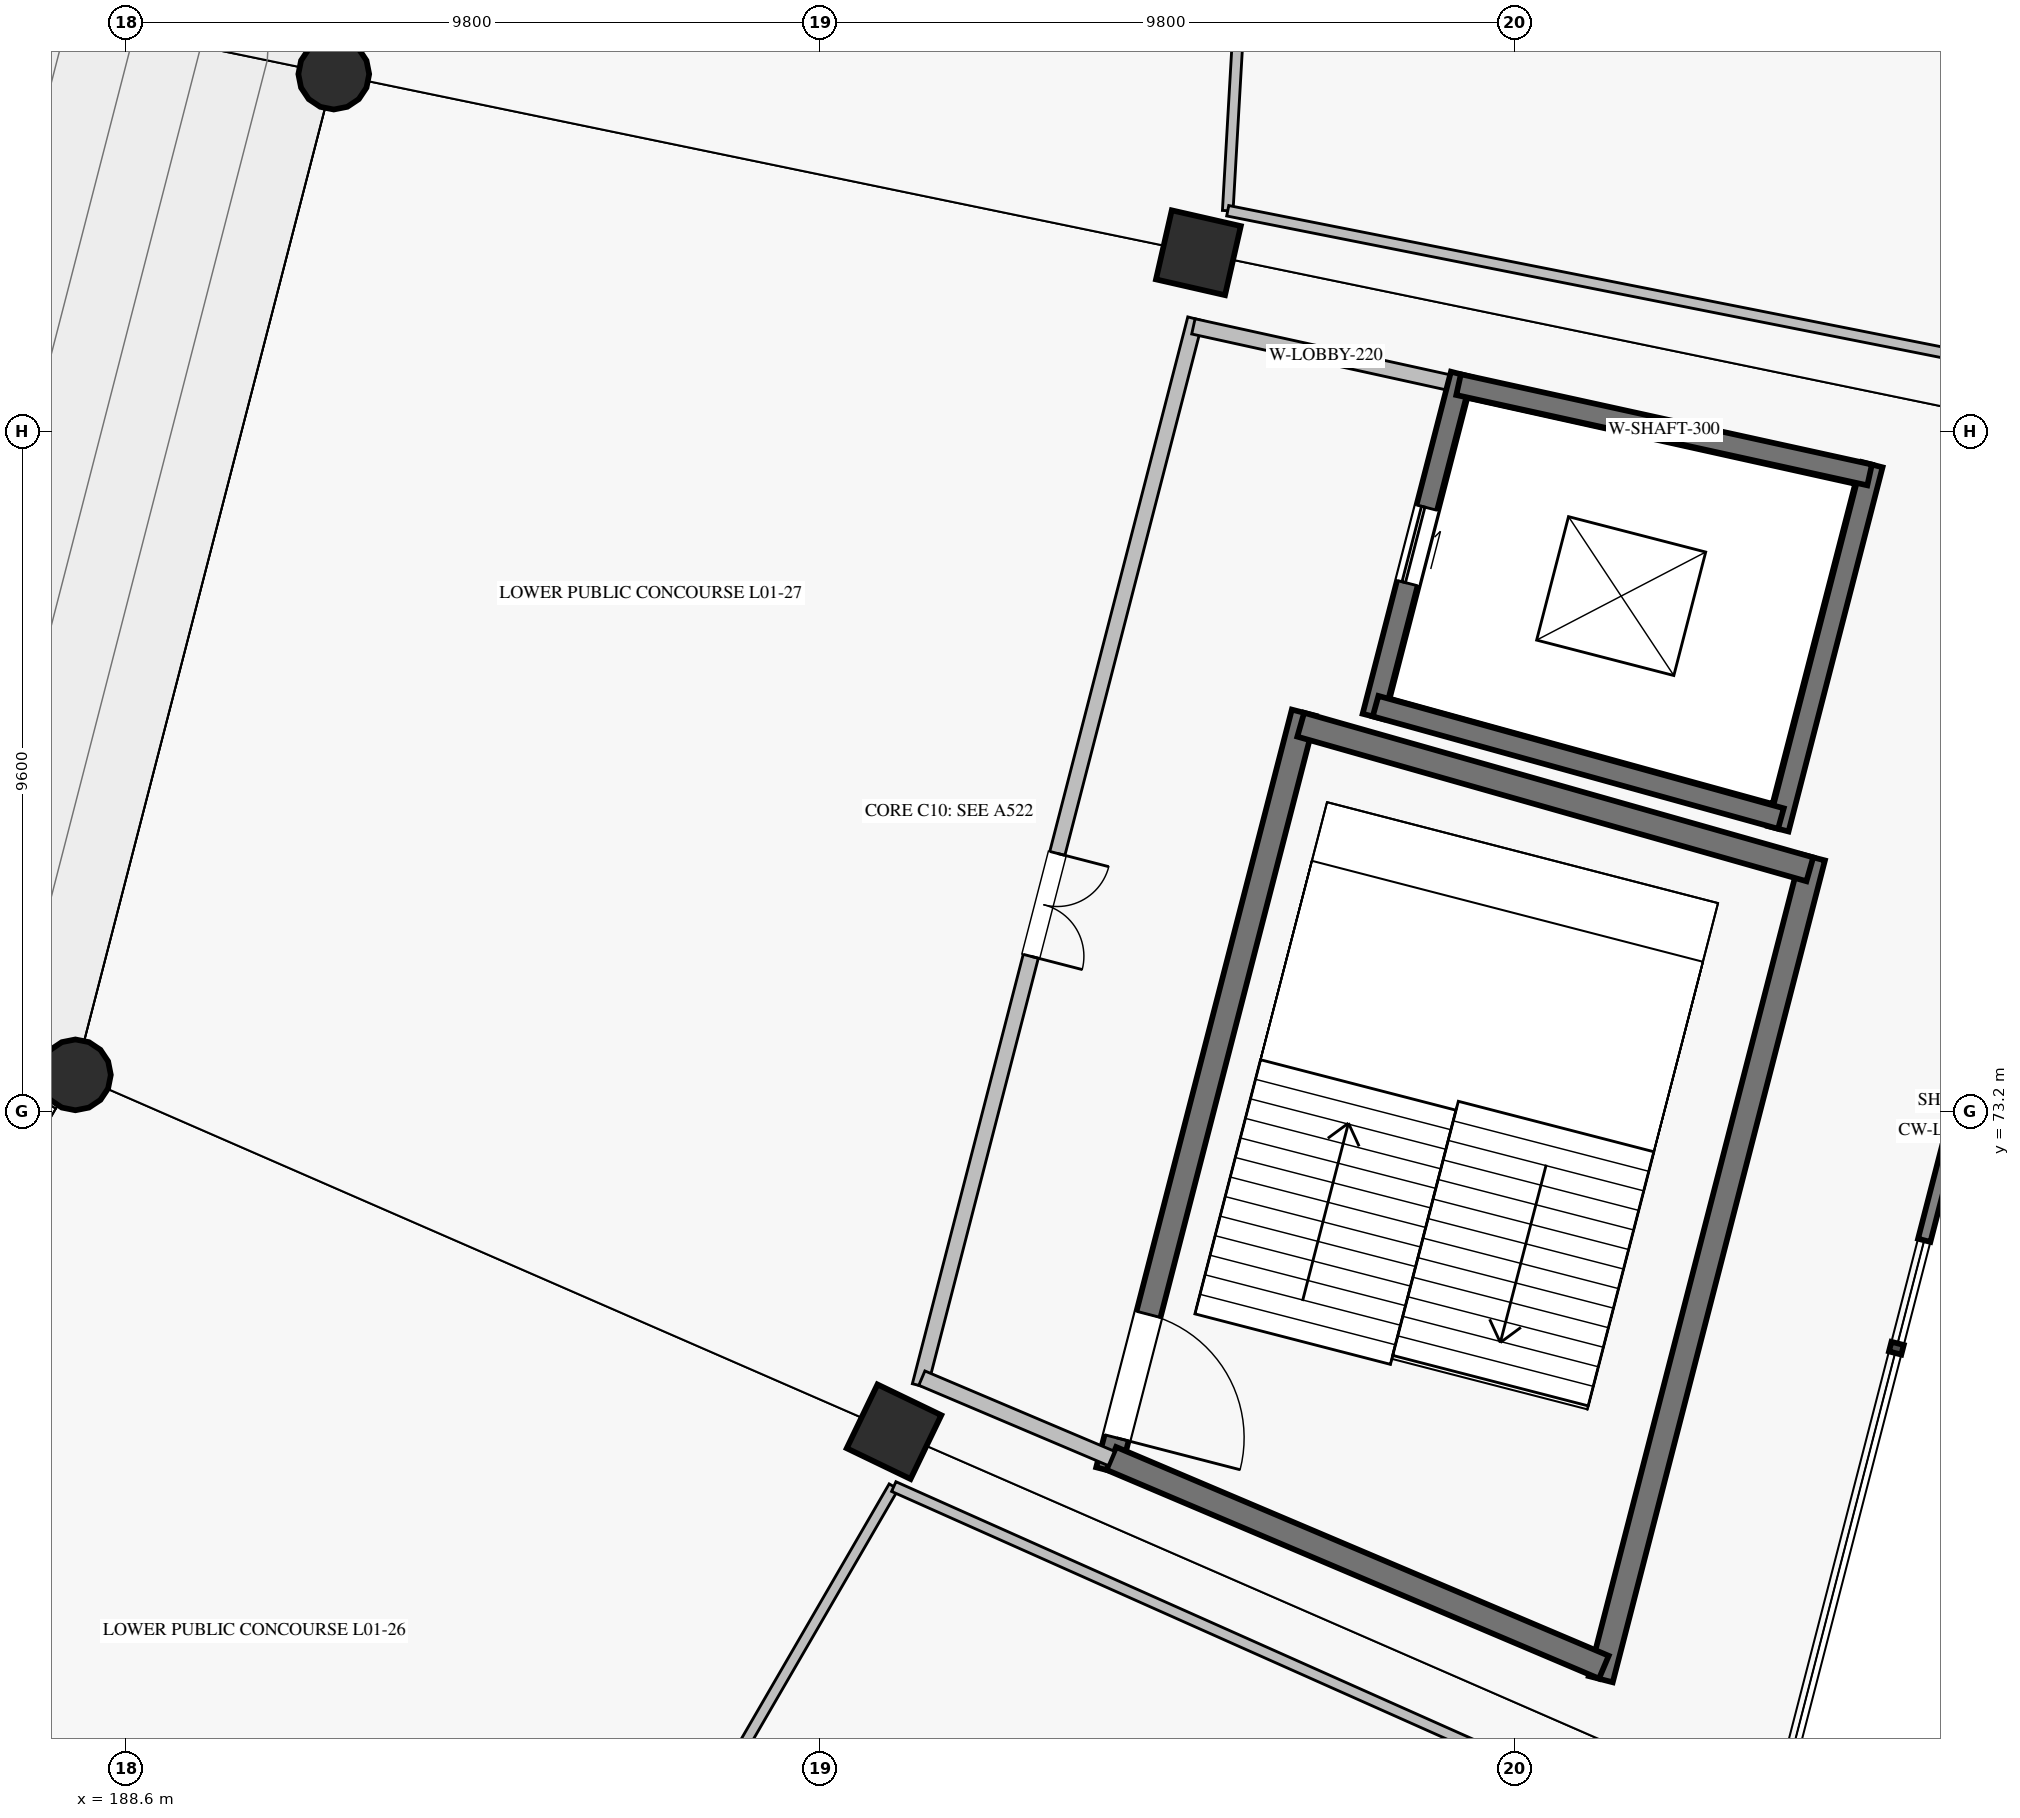
"""IFC4 building model, lengths in metres.
Left out: names, types, materials, properties, quantities, classifications, styles, units other than length and angle.
Written with IfcOpenShell. Run it as: python <this file> out.ifc"""

import sys

from ifc_helpers import new_model, si_unit, direction, frame, frame_2d, origin, origin_2d, place, context, subcontext, project, spatial, rectangle, circle, extrude, element, fill, save


model = new_model("IFC4")
c1 = context("Model", 3, precision=1e-05, world=origin(), true_north=direction((0.0, 1.0)))
c2 = subcontext(c1, "Body", "Model", "MODEL_VIEW")
j1 = project(units=[si_unit("LENGTHUNIT", "METRE"), si_unit("PLANEANGLEUNIT", "RADIAN")], contexts=[c1])
p1 = place(None, origin())
s1 = spatial("IfcSite", under=j1, at=p1, CompositionType="ELEMENT")
p2 = place(p1, origin())
s2 = spatial("IfcBuilding", under=s1, at=p2, CompositionType="ELEMENT")
p3 = place(p2, frame((0.0, 0.0, 5.78)))
s3 = spatial("IfcBuildingStorey", under=s2, at=p3, CompositionType="ELEMENT", Elevation=5.78)
for number, where, z_axis, x_axis in (
    (1, (187.886, 73.713, 0.0), (0.0, 0.0, 1.0), (0.901, -0.434, 0.0)),
    (2, (191.533, 87.84, 0.0), (0.0, 0.0, 1.0), (0.975, -0.223, 0.0)),
):
    element("IfcColumn", number, at=place(p3, frame(where, z_axis=z_axis, x_axis=x_axis)), inside=s3, PredefinedType="COLUMN", context=c2, shape_type="SweptSolid", body=[
        extrude(circle(Radius=0.5, at=origin_2d()), origin(), (0.0, 0.0, 1.0), 4.76),
    ])
for number, where, z_axis, x_axis in (
    (3, (199.441, 68.675, 0.0), (0.0, 0.0, 1.0), (0.901, -0.434, 0.0)),
    (4, (203.738, 85.318, 0.0), (0.0, 0.0, 1.0), (0.975, -0.223, 0.0)),
):
    element("IfcColumn", number, at=place(p3, frame(where, z_axis=z_axis, x_axis=x_axis)), inside=s3, PredefinedType="COLUMN", context=c2, shape_type="SweptSolid", body=[
        extrude(rectangle(XDim=1.0, YDim=1.0, at=origin_2d()), origin(), (0.0, 0.0, 1.0), 4.76),
    ])
p4 = place(p3, frame((202.464, 68.129, 0.0), z_axis=(0.0, 0.0, 1.0), x_axis=(0.249959564539, 0.968256276042, 0.0)))
e5 = element("IfcWall", 5, at=p4, inside=s3, PredefinedType="SHEAR", context=c2, shape_type="SweptSolid", body=[
    extrude(rectangle(XDim=11.047, YDim=0.35, at=frame_2d((5.523, 0.0))), origin(), (0.0, 0.0, 1.0), 4.5),
])
p5 = place(p4, frame((0.475, 0.0, 0.0)))
e6 = element("IfcOpeningElement", 6, at=p5, cuts=e5, PredefinedType="OPENING", context=c2, shape_type="SweptSolid", body=[
    extrude(rectangle(XDim=1.8, YDim=2.2, at=frame_2d((0.9, 1.1))), frame((0.0, 0.185, 0.0), z_axis=(0.0, -1.0, 0.0), x_axis=(1.0, 0.0, 0.0)), (0.0, 0.0, 1.0), 0.37),
])
p6 = place(p3, frame((209.417, 65.182, 0.0), z_axis=(0.0, 0.0, 1.0), x_axis=(0.249969221583, 0.968253782983, 0.0)))
e7 = element("IfcWall", 7, at=p6, inside=s3, PredefinedType="SHEAR", context=c2, shape_type="SweptSolid", body=[
    extrude(rectangle(XDim=11.982, YDim=0.35, at=frame_2d((5.991, 0.0))), origin(), (0.0, 0.0, 1.0), 4.5),
])
p7 = place(p3, frame((202.508, 68.299, 0.0), z_axis=(0.0, 0.0, 1.0), x_axis=(0.920704667209, -0.390260061728, 0.0)))
e8 = element("IfcWall", 8, at=p7, inside=s3, PredefinedType="SHEAR", context=c2, shape_type="SweptSolid", body=[
    extrude(rectangle(XDim=7.552, YDim=0.35, at=frame_2d((3.776, 0.0))), origin(), (0.0, 0.0, 1.0), 4.5),
])
p8 = place(p3, frame((205.182, 78.656, 0.0), z_axis=(0.0, 0.0, 1.0), x_axis=(0.961945802461, -0.273240321195, 0.0)))
e9 = element("IfcWall", 9, at=p8, inside=s3, PredefinedType="SHEAR", context=c2, shape_type="SweptSolid", body=[
    extrude(rectangle(XDim=7.47, YDim=0.35, at=frame_2d((3.735, 0.0))), origin(), (0.0, 0.0, 1.0), 4.5),
])
p9 = place(p3, frame((206.201, 78.772, 0.0), z_axis=(0.0, 0.0, 1.0), x_axis=(0.249946120621, 0.968259746549, 0.0)))
e10 = element("IfcWall", 10, at=p9, inside=s3, PredefinedType="SHEAR", context=c2, shape_type="SweptSolid", body=[
    extrude(rectangle(XDim=4.987, YDim=0.3, at=frame_2d((2.494, 0.0))), origin(), (0.0, 0.0, 1.0), 4.5),
])
p10 = place(p9, frame((1.944, 0.0, 0.0)))
e11 = element("IfcOpeningElement", 11, at=p10, cuts=e10, PredefinedType="OPENING", context=c2, shape_type="SweptSolid", body=[
    extrude(rectangle(XDim=1.1, YDim=2.2, at=frame_2d((0.55, 1.1))), frame((0.0, 0.16, 0.0), z_axis=(0.0, -1.0, 0.0), x_axis=(1.0, 0.0, 0.0)), (0.0, 0.0, 1.0), 0.32),
])
p11 = place(p3, frame((211.923, 77.186, 0.0), z_axis=(0.0, 0.0, 1.0), x_axis=(0.249918349381, 0.968266914979, 0.0)))
e12 = element("IfcWall", 12, at=p11, inside=s3, PredefinedType="SHEAR", context=c2, shape_type="SweptSolid", body=[
    extrude(rectangle(XDim=5.309, YDim=0.3, at=frame_2d((2.655, 0.0))), origin(), (0.0, 0.0, 1.0), 4.5),
])
p12 = place(p3, frame((206.239, 78.917, 0.0), z_axis=(0.0, 0.0, 1.0), x_axis=(0.963642107639, -0.267196348002, 0.0)))
e13 = element("IfcWall", 13, at=p12, inside=s3, PredefinedType="SHEAR", context=c2, shape_type="SweptSolid", body=[
    extrude(rectangle(XDim=5.937, YDim=0.3, at=frame_2d((2.969, 0.0))), origin(), (0.0, 0.0, 1.0), 4.5),
])
p13 = place(p3, frame((207.41, 83.456, 0.0), z_axis=(0.0, 0.0, 1.0), x_axis=(0.976707381947, -0.214575604509, 0.0)))
e14 = element("IfcWall", 14, at=p13, inside=s3, PredefinedType="SHEAR", context=c2, shape_type="SweptSolid", body=[
    extrude(rectangle(XDim=5.94, YDim=0.3, at=frame_2d((2.97, 0.0))), origin(), (0.0, 0.0, 1.0), 4.5),
])
p14 = place(p3, frame((199.807, 69.325, 0.0), z_axis=(0.0, 0.0, 1.0), x_axis=(0.249963472505, 0.968255267176, 0.0)))
e15 = element("IfcWall", 15, at=p14, inside=s3, PredefinedType="SOLIDWALL", context=c2, shape_type="SweptSolid", body=[
    extrude(rectangle(XDim=15.553, YDim=0.22, at=frame_2d((7.776, 0.0))), origin(), (0.0, 0.0, 1.0), 3.448),
])
p15 = place(p14, frame((6.26, 0.0, 0.0)))
e16 = element("IfcOpeningElement", 16, at=p15, cuts=e15, PredefinedType="OPENING", context=c2, shape_type="SweptSolid", body=[
    extrude(rectangle(XDim=1.5, YDim=2.2, at=frame_2d((0.75, 1.1))), frame((0.0, 0.12, 0.0), z_axis=(0.0, -1.0, 0.0), x_axis=(1.0, 0.0, 0.0)), (0.0, 0.0, 1.0), 0.24),
])
p16 = place(p3, frame((199.834, 69.432, 0.0), z_axis=(0.0, 0.0, 1.0), x_axis=(0.920711790761, -0.390243255361, 0.0)))
e17 = element("IfcWall", 17, at=p16, inside=s3, PredefinedType="SOLIDWALL", context=c2, shape_type="SweptSolid", body=[
    extrude(rectangle(XDim=2.904, YDim=0.22, at=frame_2d((1.452, 0.0))), origin(), (0.0, 0.0, 1.0), 4.5),
])
p17 = place(p3, frame((203.667, 84.278, 0.0), z_axis=(0.0, 0.0, 1.0), x_axis=(0.976714725209, -0.214542176645, 0.0)))
e18 = element("IfcWall", 18, at=p17, inside=s3, PredefinedType="SOLIDWALL", context=c2, shape_type="SweptSolid", body=[
    extrude(rectangle(XDim=3.833, YDim=0.22, at=frame_2d((1.917, 0.0))), origin(), (0.0, 0.0, 1.0), 4.5),
])
p18 = place(p3, frame((191.179, 53.658, 0.0), z_axis=(0.0, 0.0, 1.0), x_axis=(0.501617777052, 0.865089362867, 0.0)))
e19 = element("IfcWall", 19, at=p18, inside=s3, PredefinedType="PARTITIONING", context=c2, shape_type="SweptSolid", body=[
    extrude(rectangle(XDim=16.464, YDim=0.15, at=frame_2d((8.232, 0.0))), origin(), (0.0, 0.0, 1.0), 3.82),
])
p19 = place(p18, frame((7.557, 0.0, 0.0)))
e20 = element("IfcOpeningElement", 20, at=p19, cuts=e19, PredefinedType="OPENING", context=c2, shape_type="SweptSolid", body=[
    extrude(rectangle(XDim=1.35, YDim=2.15, at=frame_2d((0.675, 1.075))), frame((0.0, 0.085, 0.0), z_axis=(0.0, -1.0, 0.0), x_axis=(1.0, 0.0, 0.0)), (0.0, 0.0, 1.0), 0.17),
])
p20 = place(p3, frame((199.438, 67.901, 0.0), z_axis=(0.0, 0.0, 1.0), x_axis=(0.913245562849, -0.407409550621, 0.0)))
e21 = element("IfcWall", 21, at=p20, inside=s3, PredefinedType="PARTITIONING", context=c2, shape_type="SweptSolid", body=[
    extrude(rectangle(XDim=12.4, YDim=0.15, at=frame_2d((6.2, 0.0))), origin(), (0.0, 0.0, 1.0), 3.82),
])
p21 = place(p3, frame((204.152, 85.911, 0.0), z_axis=(0.0, 0.0, 1.0), x_axis=(0.057603503798, 0.998339539611, 0.0)))
e22 = element("IfcWall", 22, at=p21, inside=s3, PredefinedType="PARTITIONING", context=c2, shape_type="SweptSolid", body=[
    extrude(rectangle(XDim=15.444, YDim=0.15, at=frame_2d((7.722, 0.0))), origin(), (0.0, 0.0, 1.0), 3.82),
])
p22 = place(p21, frame((7.132, 0.0, 0.0)))
e23 = element("IfcOpeningElement", 23, at=p22, cuts=e22, PredefinedType="OPENING", context=c2, shape_type="SweptSolid", body=[
    extrude(rectangle(XDim=1.18, YDim=2.15, at=frame_2d((0.59, 1.075))), frame((0.0, 0.085, 0.0), z_axis=(0.0, -1.0, 0.0), x_axis=(1.0, 0.0, 0.0)), (0.0, 0.0, 1.0), 0.17),
])
p23 = place(p3, frame((204.152, 85.911, 0.0), z_axis=(0.0, 0.0, 1.0), x_axis=(0.980904167784, -0.194491680088, 0.0)))
e24 = element("IfcWall", 24, at=p23, inside=s3, PredefinedType="PARTITIONING", context=c2, shape_type="SweptSolid", body=[
    extrude(rectangle(XDim=12.257, YDim=0.15, at=frame_2d((6.128, 0.0))), origin(), (0.0, 0.0, 1.0), 3.82),
])
p24 = place(p5, frame((1.8, 0.0, 0.0), z_axis=(0.0, 0.0, 1.0), x_axis=(-1.0, 0.0, 0.0)))
e25 = element("IfcDoor", 25, at=p24, inside=s3, OperationType="SINGLE_SWING_RIGHT", PredefinedType="DOOR", context=c2, shape_type="SweptSolid", body=[
    extrude(rectangle(XDim=1.8, YDim=2.2, at=frame_2d((0.9, 1.1))), frame((0.0, 0.025, 0.0), z_axis=(0.0, -1.0, 0.0), x_axis=(1.0, 0.0, 0.0)), (0.0, 0.0, 1.0), 0.05),
])
fill(e6, e25)
p25 = place(p10, origin())
e26 = element("IfcDoor", 26, at=p25, inside=s3, OperationType="SLIDING_TO_RIGHT", PredefinedType="DOOR", context=c2, shape_type="SweptSolid", body=[
    extrude(rectangle(XDim=1.1, YDim=2.2, at=frame_2d((0.55, 1.1))), frame((0.0, 0.025, 0.0), z_axis=(0.0, -1.0, 0.0), x_axis=(1.0, 0.0, 0.0)), (0.0, 0.0, 1.0), 0.05),
])
fill(e11, e26)
p26 = place(p15, frame((1.5, 0.0, 0.0), z_axis=(0.0, 0.0, 1.0), x_axis=(-1.0, 0.0, 0.0)))
e27 = element("IfcDoor", 27, at=p26, inside=s3, OperationType="DOUBLE_DOOR_SINGLE_SWING", PredefinedType="DOOR", context=c2, shape_type="SweptSolid", body=[
    extrude(rectangle(XDim=1.5, YDim=2.2, at=frame_2d((0.75, 1.1))), frame((0.0, 0.025, 0.0), z_axis=(0.0, -1.0, 0.0), x_axis=(1.0, 0.0, 0.0)), (0.0, 0.0, 1.0), 0.05),
])
fill(e16, e27)
save(model, sys.argv[1])
